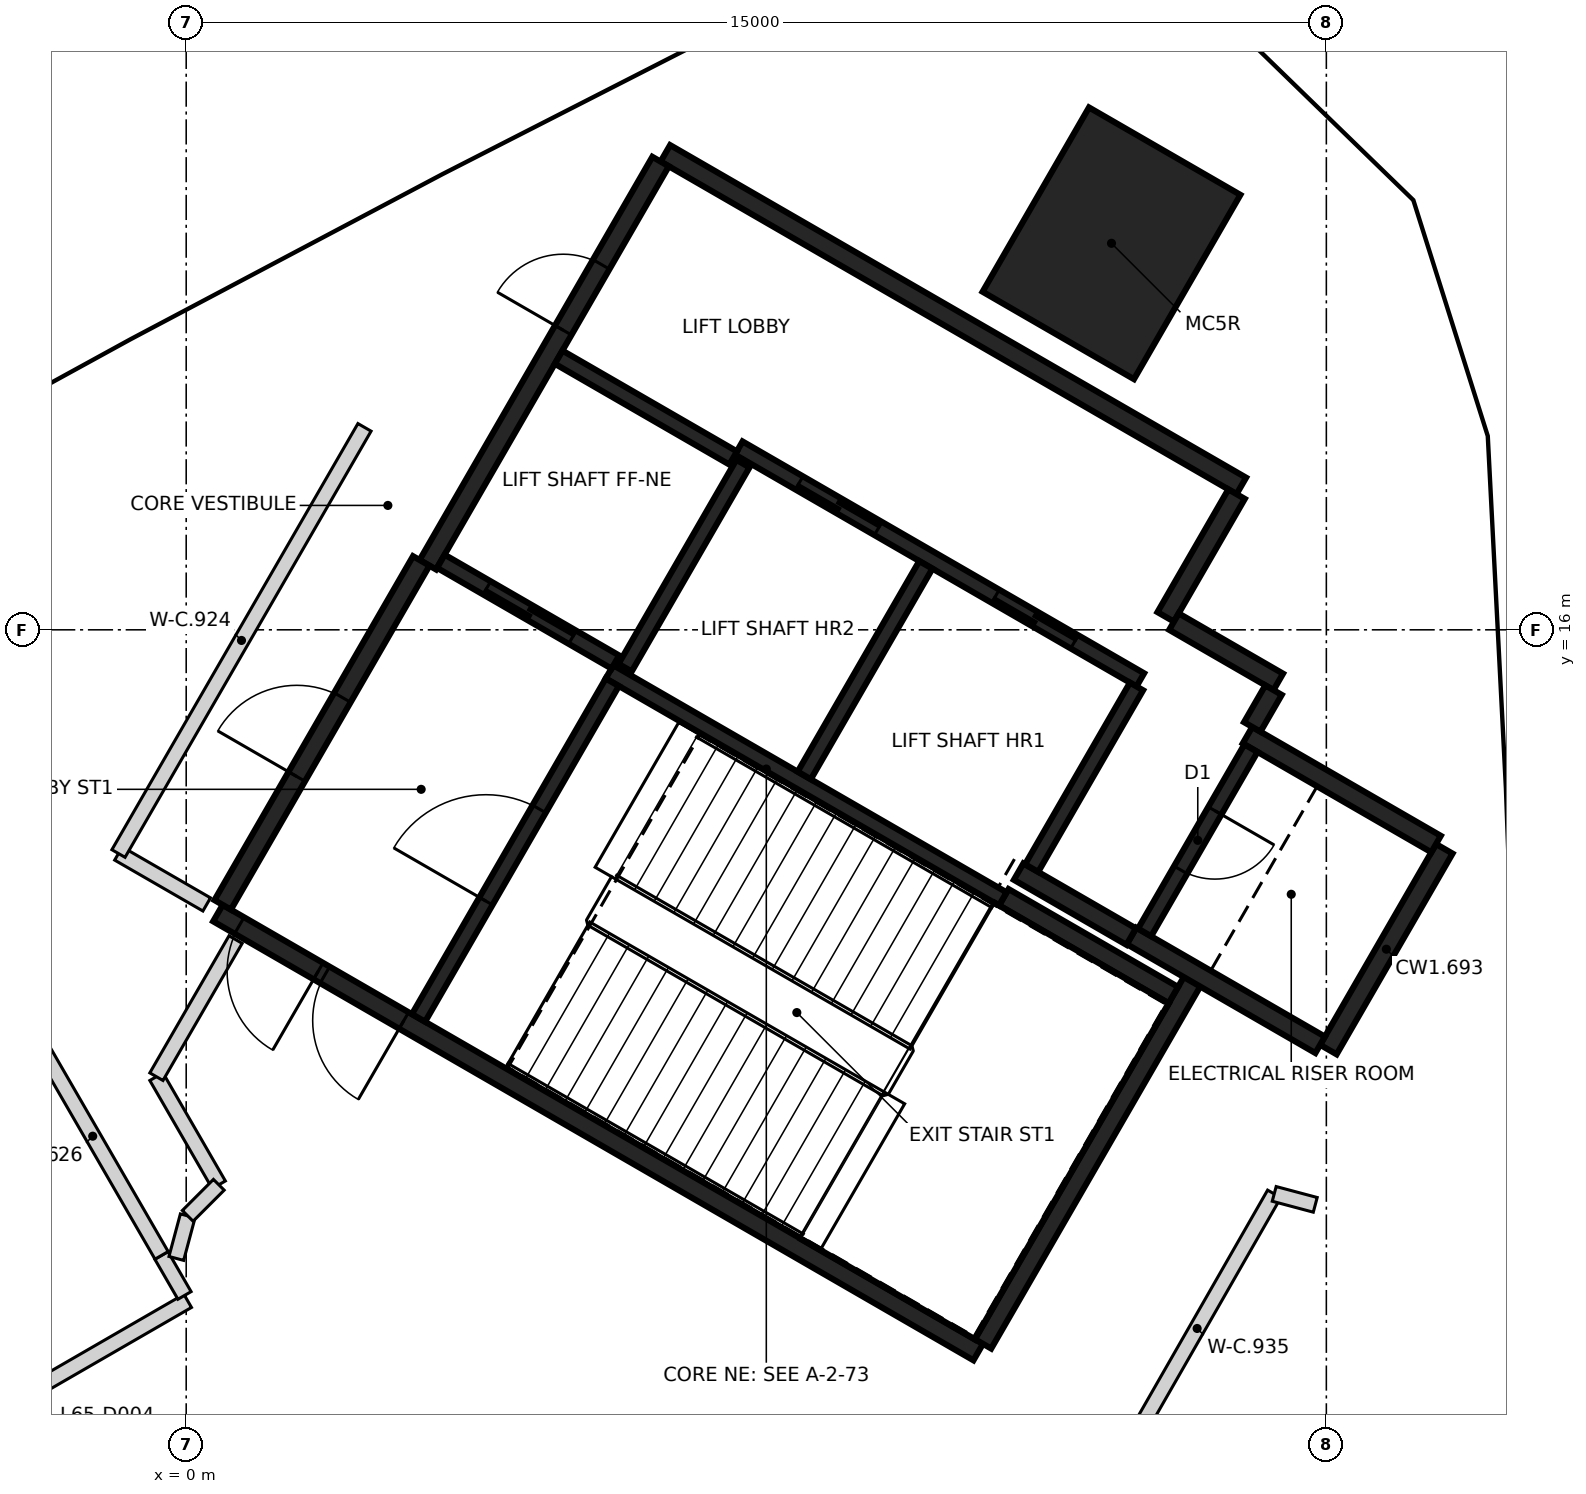
"""IFC4 building model, lengths in metres.
Left out: names, types, materials, properties, quantities, classifications, styles, units other than length and angle.
Written with IfcOpenShell. Run it as: python <this file> out.ifc"""

import sys

from ifc_helpers import new_model, si_unit, direction, frame, frame_2d, origin, origin_2d, place, context, subcontext, project, spatial, rectangle, extrude, element, fill, save


model = new_model("IFC4")
c1 = context("Model", 3, precision=1e-05, world=origin(), true_north=direction((0.0, 1.0)))
c2 = subcontext(c1, "Body", "Model", "MODEL_VIEW")
j1 = project(units=[si_unit("LENGTHUNIT", "METRE"), si_unit("PLANEANGLEUNIT", "RADIAN")], contexts=[c1])
p1 = place(None, origin())
s1 = spatial("IfcSite", under=j1, at=p1, CompositionType="ELEMENT")
p2 = place(p1, origin())
s2 = spatial("IfcBuilding", under=s1, at=p2, CompositionType="ELEMENT")
p3 = place(p2, frame((0.0, 0.0, 257.4)))
s3 = spatial("IfcBuildingStorey", under=s2, at=p3, CompositionType="ELEMENT", Elevation=257.4)
p4 = place(p3, frame((12.173, 21.085, -0.4), z_axis=(0.0, 0.0, 1.0), x_axis=(0.5, 0.866025403784, 0.0)))
e1 = element("IfcColumn", 1, at=p4, inside=s3, PredefinedType="COLUMN", context=c2, shape_type="SweptSolid", body=[
    extrude(rectangle(XDim=2.8, YDim=2.3, at=origin_2d()), origin(), (0.0, 0.0, 1.0), 4.85),
])
p5 = place(p3, frame((10.42, 6.498, 0.0), z_axis=(0.0, 0.0, 1.0), x_axis=(-0.866021906294, 0.500006057782, 0.0)))
e2 = element("IfcWall", 2, at=p5, inside=s3, PredefinedType="SHEAR", context=c2, shape_type="SweptSolid", body=[
    extrude(rectangle(XDim=11.55, YDim=0.25, at=frame_2d((5.775, 0.0))), origin(), (0.0, 0.0, 1.0), 4.45),
])
p6 = place(p5, frame((10.025, 0.0, 0.0)))
e3 = element("IfcOpeningElement", 3, at=p6, cuts=e2, PredefinedType="OPENING", context=c2, shape_type="SweptSolid", body=[
    extrude(rectangle(XDim=1.2, YDim=2.1, at=frame_2d((0.6, 1.05))), frame((0.0, 0.135, 0.0), z_axis=(0.0, -1.0, 0.0), x_axis=(1.0, 0.0, 0.0)), (0.0, 0.0, 1.0), 0.27),
])
p7 = place(p5, frame((8.725, 0.0, 0.0)))
e4 = element("IfcOpeningElement", 4, at=p7, cuts=e2, PredefinedType="OPENING", context=c2, shape_type="SweptSolid", body=[
    extrude(rectangle(XDim=1.2, YDim=2.1, at=frame_2d((0.6, 1.05))), frame((0.0, 0.135, 0.0), z_axis=(0.0, -1.0, 0.0), x_axis=(1.0, 0.0, 0.0)), (0.0, 0.0, 1.0), 0.27),
])
p8 = place(p3, frame((6.304, 22.269, 0.0), z_axis=(0.0, 0.0, 1.0), x_axis=(0.866022959057, -0.500004234368, 0.0)))
e5 = element("IfcWall", 5, at=p8, inside=s3, PredefinedType="SHEAR", context=c2, shape_type="SweptSolid", body=[
    extrude(rectangle(XDim=8.75, YDim=0.25, at=frame_2d((4.375, 0.0))), origin(), (0.0, 0.0, 1.0), 4.45),
])
p9 = place(p3, frame((3.179, 16.856, 0.0), z_axis=(0.0, 0.0, 1.0), x_axis=(0.500001955336, 0.866024274868, 0.0)))
e6 = element("IfcWall", 6, at=p9, inside=s3, PredefinedType="SHEAR", context=c2, shape_type="SweptSolid", body=[
    extrude(rectangle(XDim=6.125, YDim=0.25, at=frame_2d((3.062, 0.0))), origin(), (0.0, 0.0, 1.0), 4.45),
])
p10 = place(p9, frame((3.563, 0.0, 0.0)))
e7 = element("IfcOpeningElement", 7, at=p10, cuts=e6, PredefinedType="OPENING", context=c2, shape_type="SweptSolid", body=[
    extrude(rectangle(XDim=1.0, YDim=2.1, at=frame_2d((0.5, 1.05))), frame((0.0, 0.135, 0.0), z_axis=(0.0, -1.0, 0.0), x_axis=(1.0, 0.0, 0.0)), (0.0, 0.0, 1.0), 0.27),
])
p11 = place(p3, frame((0.48, 12.381, 0.0), z_axis=(0.0, 0.0, 1.0), x_axis=(0.49999885962, 0.866026062182, 0.0)))
e8 = element("IfcWall", 8, at=p11, inside=s3, PredefinedType="SHEAR", context=c2, shape_type="SweptSolid", body=[
    extrude(rectangle(XDim=5.225, YDim=0.25, at=frame_2d((2.612, 0.0))), origin(), (0.0, 0.0, 1.0), 4.45),
])
p12 = place(p11, frame((1.95, 0.0, 0.0)))
e9 = element("IfcOpeningElement", 9, at=p12, cuts=e8, PredefinedType="OPENING", context=c2, shape_type="SweptSolid", body=[
    extrude(rectangle(XDim=1.2, YDim=2.1, at=frame_2d((0.6, 1.05))), frame((0.0, 0.135, 0.0), z_axis=(0.0, -1.0, 0.0), x_axis=(1.0, 0.0, 0.0)), (0.0, 0.0, 1.0), 0.27),
])
p13 = place(p3, frame((13.238, 11.378, 0.0), z_axis=(0.0, 0.0, 1.0), x_axis=(-0.500008851346, -0.866020293397, 0.0)))
e10 = element("IfcWall", 10, at=p13, inside=s3, PredefinedType="SHEAR", context=c2, shape_type="SweptSolid", body=[
    extrude(rectangle(XDim=5.51, YDim=0.25, at=frame_2d((2.755, 0.0))), origin(), (0.0, 0.0, 1.0), 4.45),
])
p14 = place(p3, frame((16.552, 13.119, 0.0), z_axis=(0.0, 0.0, 1.0), x_axis=(-0.499978833458, -0.866037623948, 0.0)))
e11 = element("IfcWall", 11, at=p14, inside=s3, PredefinedType="SHEAR", context=c2, shape_type="SweptSolid", body=[
    extrude(rectangle(XDim=3.05, YDim=0.25, at=frame_2d((1.525, 0.0))), origin(), (0.0, 0.0, 1.0), 4.45),
])
p15 = place(p3, frame((14.918, 10.54, 0.0), z_axis=(0.0, 0.0, 1.0), x_axis=(-0.866063538972, 0.499933942099, 0.0)))
e12 = element("IfcWall", 12, at=p15, inside=s3, PredefinedType="SHEAR", context=c2, shape_type="SweptSolid", body=[
    extrude(rectangle(XDim=2.865, YDim=0.25, at=frame_2d((1.432, 0.0))), origin(), (0.0, 0.0, 1.0), 4.45),
])
p16 = place(p3, frame((13.963, 14.614, 0.0), z_axis=(0.0, 0.0, 1.0), x_axis=(0.866042235819, -0.499970844928, 0.0)))
e13 = element("IfcWall", 13, at=p16, inside=s3, PredefinedType="SHEAR", context=c2, shape_type="SweptSolid", body=[
    extrude(rectangle(XDim=2.865, YDim=0.25, at=frame_2d((1.432, 0.0))), origin(), (0.0, 0.0, 1.0), 4.45),
])
p17 = place(p3, frame((10.757, 12.481, 0.0), z_axis=(0.0, 0.0, 1.0), x_axis=(0.866022940537, -0.500004266446, 0.0)))
e14 = element("IfcWall", 14, at=p17, inside=s3, PredefinedType="SHEAR", context=c2, shape_type="SweptSolid", body=[
    extrude(rectangle(XDim=2.575, YDim=0.25, at=frame_2d((1.287, 0.0))), origin(), (0.0, 0.0, 1.0), 4.45),
])
p18 = place(p3, frame((13.819, 17.785, 0.0), z_axis=(0.0, 0.0, 1.0), x_axis=(-0.500039802285, -0.866002422705, 0.0)))
e15 = element("IfcWall", 15, at=p18, inside=s3, PredefinedType="SHEAR", context=c2, shape_type="SweptSolid", body=[
    extrude(rectangle(XDim=1.865, YDim=0.25, at=frame_2d((0.932, 0.0))), origin(), (0.0, 0.0, 1.0), 4.45),
])
p19 = place(p3, frame((12.433, 11.964, 0.0), z_axis=(0.0, 0.0, 1.0), x_axis=(-0.866038183914, 0.499977863513, 0.0)))
e16 = element("IfcWall", 16, at=p19, inside=s3, PredefinedType="SHEAR", context=c2, shape_type="SweptSolid", body=[
    extrude(rectangle(XDim=1.71, YDim=0.25, at=frame_2d((0.855, 0.0))), origin(), (0.0, 0.0, 1.0), 4.45),
])
p20 = place(p3, frame((12.995, 16.108, 0.0), z_axis=(0.0, 0.0, 1.0), x_axis=(0.866044474677, -0.49996696679, 0.0)))
e17 = element("IfcWall", 17, at=p20, inside=s3, PredefinedType="SHEAR", context=c2, shape_type="SweptSolid", body=[
    extrude(rectangle(XDim=1.584, YDim=0.25, at=frame_2d((0.792, 0.0))), origin(), (0.0, 0.0, 1.0), 4.45),
])
p21 = place(p3, frame((14.305, 15.207, 0.0), z_axis=(0.0, 0.0, 1.0), x_axis=(-0.499848422343, -0.866112899501, 0.0)))
e18 = element("IfcWall", 18, at=p21, inside=s3, PredefinedType="SHEAR", context=c2, shape_type="SweptSolid", body=[
    extrude(rectangle(XDim=0.559, YDim=0.25, at=frame_2d((0.28, 0.0))), origin(), (0.0, 0.0, 1.0), 4.45),
])
p22 = place(p3, frame((12.552, 15.342, 0.0), z_axis=(0.0, 0.0, 1.0), x_axis=(-0.866030299012, 0.499991521122, 0.0)))
e19 = element("IfcWall", 19, at=p22, inside=s3, PredefinedType="SHEAR", context=c2, shape_type="SweptSolid", body=[
    extrude(rectangle(XDim=6.1, YDim=0.2, at=frame_2d((3.05, 0.0))), origin(), (0.0, 0.0, 1.0), 4.45),
])
p23 = place(p22, frame((1.0, 0.0, 0.0)))
e20 = element("IfcOpeningElement", 20, at=p23, cuts=e19, PredefinedType="OPENING", context=c2, shape_type="SweptSolid", body=[
    extrude(rectangle(XDim=1.2, YDim=2.1, at=frame_2d((0.6, 1.05))), frame((0.0, 0.11, 0.0), z_axis=(0.0, -1.0, 0.0), x_axis=(1.0, 0.0, 0.0)), (0.0, 0.0, 1.0), 0.22),
])
p24 = place(p22, frame((3.982, 0.0, 0.0)))
e21 = element("IfcOpeningElement", 21, at=p24, cuts=e19, PredefinedType="OPENING", context=c2, shape_type="SweptSolid", body=[
    extrude(rectangle(XDim=1.2, YDim=2.1, at=frame_2d((0.6, 1.05))), frame((0.0, 0.11, 0.0), z_axis=(0.0, -1.0, 0.0), x_axis=(1.0, 0.0, 0.0)), (0.0, 0.0, 1.0), 0.22),
])
p25 = place(p3, frame((10.743, 12.46, 0.0), z_axis=(0.0, 0.0, 1.0), x_axis=(-0.866018848283, 0.500011354289, 0.0)))
e22 = element("IfcWall", 22, at=p25, inside=s3, PredefinedType="SHEAR", context=c2, shape_type="SweptSolid", body=[
    extrude(rectangle(XDim=5.974, YDim=0.2, at=frame_2d((2.987, 0.0))), origin(), (0.0, 0.0, 1.0), 4.45),
])
p26 = place(p3, frame((3.057, 10.895, 0.0), z_axis=(0.0, 0.0, 1.0), x_axis=(0.500027839223, 0.866009330205, 0.0)))
e23 = element("IfcWall", 23, at=p26, inside=s3, PredefinedType="SHEAR", context=c2, shape_type="SweptSolid", body=[
    extrude(rectangle(XDim=5.098, YDim=0.2, at=frame_2d((2.549, 0.0))), origin(), (0.0, 0.0, 1.0), 4.45),
])
p27 = place(p26, frame((1.774, 0.0, 0.0)))
e24 = element("IfcOpeningElement", 24, at=p27, cuts=e23, PredefinedType="OPENING", context=c2, shape_type="SweptSolid", body=[
    extrude(rectangle(XDim=1.4, YDim=2.1, at=frame_2d((0.7, 1.05))), frame((0.0, 0.11, 0.0), z_axis=(0.0, -1.0, 0.0), x_axis=(1.0, 0.0, 0.0)), (0.0, 0.0, 1.0), 0.22),
])
p28 = place(p3, frame((8.132, 14.084, 0.0), z_axis=(0.0, 0.0, 1.0), x_axis=(0.500030834389, 0.86600760081, 0.0)))
e25 = element("IfcWall", 25, at=p28, inside=s3, PredefinedType="SHEAR", context=c2, shape_type="SweptSolid", body=[
    extrude(rectangle(XDim=3.198, YDim=0.2, at=frame_2d((1.599, 0.0))), origin(), (0.0, 0.0, 1.0), 4.45),
])
p29 = place(p3, frame((14.008, 14.442, 0.0), z_axis=(0.0, 0.0, 1.0), x_axis=(-0.499986818241, -0.866033014143, 0.0)))
e26 = element("IfcWall", 26, at=p29, inside=s3, PredefinedType="SHEAR", context=c2, shape_type="SweptSolid", body=[
    extrude(rectangle(XDim=2.798, YDim=0.2, at=frame_2d((1.399, 0.0))), origin(), (0.0, 0.0, 1.0), 4.45),
])
p30 = place(p29, frame((0.949, 0.0, 0.0)))
e27 = element("IfcOpeningElement", 27, at=p30, cuts=e26, PredefinedType="OPENING", context=c2, shape_type="SweptSolid", body=[
    extrude(rectangle(XDim=0.9, YDim=2.1, at=frame_2d((0.45, 1.05))), frame((0.0, 0.11, 0.0), z_axis=(0.0, -1.0, 0.0), x_axis=(1.0, 0.0, 0.0)), (0.0, 0.0, 1.0), 0.22),
])
p31 = place(p3, frame((12.502, 15.255, 0.0), z_axis=(0.0, 0.0, 1.0), x_axis=(-0.499965018551, -0.866045599391, 0.0)))
e28 = element("IfcWall", 28, at=p31, inside=s3, PredefinedType="SHEAR", context=c2, shape_type="SweptSolid", body=[
    extrude(rectangle(XDim=2.759, YDim=0.2, at=frame_2d((1.379, 0.0))), origin(), (0.0, 0.0, 1.0), 4.45),
])
p32 = place(p3, frame((7.324, 18.187, 0.0), z_axis=(0.0, 0.0, 1.0), x_axis=(-0.499967891604, -0.866043940782, 0.0)))
e29 = element("IfcWall", 29, at=p32, inside=s3, PredefinedType="SHEAR", context=c2, shape_type="SweptSolid", body=[
    extrude(rectangle(XDim=3.1, YDim=0.2, at=frame_2d((1.55, 0.0))), origin(), (0.0, 0.0, 1.0), 4.45),
])
p33 = place(p3, frame((5.646, 15.576, 0.0), z_axis=(0.0, 0.0, 1.0), x_axis=(-0.866018407898, 0.500012117035, 0.0)))
e30 = element("IfcWall", 30, at=p33, inside=s3, PredefinedType="SHEAR", context=c2, shape_type="SweptSolid", body=[
    extrude(rectangle(XDim=2.651, YDim=0.2, at=frame_2d((1.325, 0.0))), origin(), (0.0, 0.0, 1.0), 4.45),
])
p34 = place(p33, frame((0.652, 0.0, 0.0)))
e31 = element("IfcOpeningElement", 31, at=p34, cuts=e30, PredefinedType="OPENING", context=c2, shape_type="SweptSolid", body=[
    extrude(rectangle(XDim=1.3, YDim=2.1, at=frame_2d((0.65, 1.05))), frame((0.0, 0.11, 0.0), z_axis=(0.0, -1.0, 0.0), x_axis=(1.0, 0.0, 0.0)), (0.0, 0.0, 1.0), 0.22),
])
p35 = place(p3, frame((7.196, 18.26, 0.0), z_axis=(0.0, 0.0, 1.0), x_axis=(-0.866018407898, 0.500012117035, 0.0)))
e32 = element("IfcWall", 32, at=p35, inside=s3, PredefinedType="SHEAR", context=c2, shape_type="SweptSolid", body=[
    extrude(rectangle(XDim=2.651, YDim=0.2, at=frame_2d((1.325, 0.0))), origin(), (0.0, 0.0, 1.0), 4.45),
])
p36 = place(p3, frame((-6.687, 3.298, 0.0), z_axis=(0.0, 0.0, 1.0), x_axis=(0.865948809334, 0.500132642019, 0.0)))
e33 = element("IfcWall", 33, at=p36, inside=s3, PredefinedType="PARTITIONING", context=c2, shape_type="SweptSolid", body=[
    extrude(rectangle(XDim=7.745, YDim=0.2, at=frame_2d((3.873, 0.0))), origin(), (0.0, 0.0, 1.0), 4.45),
])
p37 = place(p36, frame((4.128, 0.0, 0.0)))
e34 = element("IfcOpeningElement", 34, at=p37, cuts=e33, PredefinedType="OPENING", context=c2, shape_type="SweptSolid", body=[
    extrude(rectangle(XDim=1.2, YDim=2.1, at=frame_2d((0.6, 1.05))), frame((0.0, 0.11, 0.0), z_axis=(0.0, -1.0, 0.0), x_axis=(1.0, 0.0, 0.0)), (0.0, 0.0, 1.0), 0.22),
])
p38 = place(p3, frame((-0.891, 13.057, 0.0), z_axis=(0.0, 0.0, 1.0), x_axis=(0.866206814563, -0.499685655593, 0.0)))
e35 = element("IfcWall", 35, at=p38, inside=s3, PredefinedType="PARTITIONING", context=c2, shape_type="SweptSolid", body=[
    extrude(rectangle(XDim=1.34, YDim=0.2, at=frame_2d((0.67, 0.0))), origin(), (0.0, 0.0, 1.0), 4.45),
])
p39 = place(p3, frame((-0.891, 13.057, 0.0), z_axis=(0.0, 0.0, 1.0), x_axis=(0.499975989083, 0.86603926605, 0.0)))
e36 = element("IfcWall", 36, at=p39, inside=s3, PredefinedType="PARTITIONING", context=c2, shape_type="SweptSolid", body=[
    extrude(rectangle(XDim=6.474, YDim=0.2, at=frame_2d((3.237, 0.0))), origin(), (0.0, 0.0, 1.0), 4.45),
])
p40 = place(p3, frame((-0.392, 10.121, 0.0), z_axis=(0.0, 0.0, 1.0), x_axis=(0.499992716633, -0.866029608798, 0.0)))
e37 = element("IfcWall", 37, at=p40, inside=s3, PredefinedType="PARTITIONING", context=c2, shape_type="SweptSolid", body=[
    extrude(rectangle(XDim=1.642, YDim=0.2, at=frame_2d((0.821, 0.0))), origin(), (0.0, 0.0, 1.0), 4.45),
])
p41 = place(p3, frame((-0.392, 10.121, 0.0), z_axis=(0.0, 0.0, 1.0), x_axis=(0.50017216111, 0.865925983702, 0.0)))
e38 = element("IfcWall", 38, at=p41, inside=s3, PredefinedType="PARTITIONING", context=c2, shape_type="SweptSolid", body=[
    extrude(rectangle(XDim=2.083, YDim=0.2, at=frame_2d((1.042, 0.0))), origin(), (0.0, 0.0, 1.0), 4.45),
])
p42 = place(p3, frame((-0.326, 7.769, 0.0), z_axis=(0.0, 0.0, 1.0), x_axis=(0.500244126355, -0.865884411482, 0.0)))
e39 = element("IfcWall", 39, at=p42, inside=s3, PredefinedType="PARTITIONING", context=c2, shape_type="SweptSolid", body=[
    extrude(rectangle(XDim=0.608, YDim=0.2, at=frame_2d((0.304, 0.0))), origin(), (0.0, 0.0, 1.0), 4.45),
])
p43 = place(p3, frame((-0.13, 7.73, 0.0), z_axis=(0.0, 0.0, 1.0), x_axis=(0.258553659464, 0.965996897085, 0.0)))
e40 = element("IfcWall", 40, at=p43, inside=s3, PredefinedType="PARTITIONING", context=c2, shape_type="SweptSolid", body=[
    extrude(rectangle(XDim=0.58, YDim=0.2, at=frame_2d((0.29, 0.0))), origin(), (0.0, 0.0, 1.0), 4.45),
])
p44 = place(p3, frame((0.02, 8.29, 0.0), z_axis=(0.0, 0.0, 1.0), x_axis=(0.707106781187, 0.707106781187, 0.0)))
e41 = element("IfcWall", 41, at=p44, inside=s3, PredefinedType="PARTITIONING", context=c2, shape_type="SweptSolid", body=[
    extrude(rectangle(XDim=0.578, YDim=0.2, at=frame_2d((0.289, 0.0))), origin(), (0.0, 0.0, 1.0), 4.45),
])
p45 = place(p3, frame((12.286, 5.038, 0.0), z_axis=(0.0, 0.0, 1.0), x_axis=(0.496995625394, 0.86775304571, 0.0)))
e42 = element("IfcWall", 42, at=p45, inside=s3, PredefinedType="PARTITIONING", context=c2, shape_type="SweptSolid", body=[
    extrude(rectangle(XDim=4.081, YDim=0.2, at=frame_2d((2.04, 0.0))), origin(), (0.0, 0.0, 1.0), 4.45),
])
p46 = place(p3, frame((14.314, 8.579, 0.0), z_axis=(0.0, 0.0, 1.0), x_axis=(0.966220438204, -0.257717024656, 0.0)))
e43 = element("IfcWall", 43, at=p46, inside=s3, PredefinedType="PARTITIONING", context=c2, shape_type="SweptSolid", body=[
    extrude(rectangle(XDim=0.559, YDim=0.2, at=frame_2d((0.279, 0.0))), origin(), (0.0, 0.0, 1.0), 4.45),
])
p47 = place(p3, frame((-2.136, 10.906, 0.0), z_axis=(0.0, 0.0, 1.0), x_axis=(0.500379794091, -0.865806018497, 0.0)))
e44 = element("IfcWall", 44, at=p47, inside=s3, PredefinedType="PARTITIONING", context=c2, shape_type="SweptSolid", body=[
    extrude(rectangle(XDim=3.622, YDim=0.2, at=frame_2d((1.811, 0.0))), origin(), (0.0, 0.0, 1.0), 4.45),
])
p48 = place(p34, origin())
e45 = element("IfcDoor", 45, at=p48, inside=s3, OperationType="SLIDING_TO_RIGHT", PredefinedType="DOOR", context=c2, shape_type="SweptSolid", body=[
    extrude(rectangle(XDim=1.3, YDim=2.1, at=frame_2d((0.65, 1.05))), frame((0.0, 0.025, 0.0), z_axis=(0.0, -1.0, 0.0), x_axis=(1.0, 0.0, 0.0)), (0.0, 0.0, 1.0), 0.05),
])
fill(e31, e45)
p49 = place(p23, origin())
e46 = element("IfcDoor", 46, at=p49, inside=s3, OperationType="DOUBLE_DOOR_SLIDING", PredefinedType="DOOR", context=c2, shape_type="SweptSolid", body=[
    extrude(rectangle(XDim=1.2, YDim=2.1, at=frame_2d((0.6, 1.05))), frame((0.0, 0.025, 0.0), z_axis=(0.0, -1.0, 0.0), x_axis=(1.0, 0.0, 0.0)), (0.0, 0.0, 1.0), 0.05),
])
fill(e20, e46)
p50 = place(p24, origin())
e47 = element("IfcDoor", 47, at=p50, inside=s3, OperationType="DOUBLE_DOOR_SLIDING", PredefinedType="DOOR", context=c2, shape_type="SweptSolid", body=[
    extrude(rectangle(XDim=1.2, YDim=2.1, at=frame_2d((0.6, 1.05))), frame((0.0, 0.025, 0.0), z_axis=(0.0, -1.0, 0.0), x_axis=(1.0, 0.0, 0.0)), (0.0, 0.0, 1.0), 0.05),
])
fill(e21, e47)
p51 = place(p10, origin())
e48 = element("IfcDoor", 48, at=p51, inside=s3, OperationType="SINGLE_SWING_LEFT", PredefinedType="DOOR", context=c2, shape_type="SweptSolid", body=[
    extrude(rectangle(XDim=1.0, YDim=2.1, at=frame_2d((0.5, 1.05))), frame((0.0, 0.025, 0.0), z_axis=(0.0, -1.0, 0.0), x_axis=(1.0, 0.0, 0.0)), (0.0, 0.0, 1.0), 0.05),
])
fill(e7, e48)
p52 = place(p6, origin())
e49 = element("IfcDoor", 49, at=p52, inside=s3, OperationType="SINGLE_SWING_LEFT", PredefinedType="DOOR", context=c2, shape_type="SweptSolid", body=[
    extrude(rectangle(XDim=1.2, YDim=2.1, at=frame_2d((0.6, 1.05))), frame((0.0, 0.025, 0.0), z_axis=(0.0, -1.0, 0.0), x_axis=(1.0, 0.0, 0.0)), (0.0, 0.0, 1.0), 0.05),
])
fill(e3, e49)
p53 = place(p7, origin())
e50 = element("IfcDoor", 50, at=p53, inside=s3, OperationType="SINGLE_SWING_RIGHT", PredefinedType="DOOR", context=c2, shape_type="SweptSolid", body=[
    extrude(rectangle(XDim=1.2, YDim=2.1, at=frame_2d((0.6, 1.05))), frame((0.0, 0.025, 0.0), z_axis=(0.0, -1.0, 0.0), x_axis=(1.0, 0.0, 0.0)), (0.0, 0.0, 1.0), 0.05),
])
fill(e4, e50)
p54 = place(p27, origin())
e51 = element("IfcDoor", 51, at=p54, inside=s3, OperationType="SINGLE_SWING_RIGHT", PredefinedType="DOOR", context=c2, shape_type="SweptSolid", body=[
    extrude(rectangle(XDim=1.4, YDim=2.1, at=frame_2d((0.7, 1.05))), frame((0.0, 0.025, 0.0), z_axis=(0.0, -1.0, 0.0), x_axis=(1.0, 0.0, 0.0)), (0.0, 0.0, 1.0), 0.05),
])
fill(e24, e51)
p55 = place(p30, origin())
e52 = element("IfcDoor", 52, at=p55, inside=s3, OperationType="SINGLE_SWING_LEFT", PredefinedType="DOOR", context=c2, shape_type="SweptSolid", body=[
    extrude(rectangle(XDim=0.9, YDim=2.1, at=frame_2d((0.45, 1.05))), frame((0.0, 0.025, 0.0), z_axis=(0.0, -1.0, 0.0), x_axis=(1.0, 0.0, 0.0)), (0.0, 0.0, 1.0), 0.05),
])
fill(e27, e52)
p56 = place(p12, origin())
e53 = element("IfcDoor", 53, at=p56, inside=s3, OperationType="SINGLE_SWING_LEFT", PredefinedType="DOOR", context=c2, shape_type="SweptSolid", body=[
    extrude(rectangle(XDim=1.2, YDim=2.1, at=frame_2d((0.6, 1.05))), frame((0.0, 0.025, 0.0), z_axis=(0.0, -1.0, 0.0), x_axis=(1.0, 0.0, 0.0)), (0.0, 0.0, 1.0), 0.05),
])
fill(e9, e53)
save(model, sys.argv[1])
